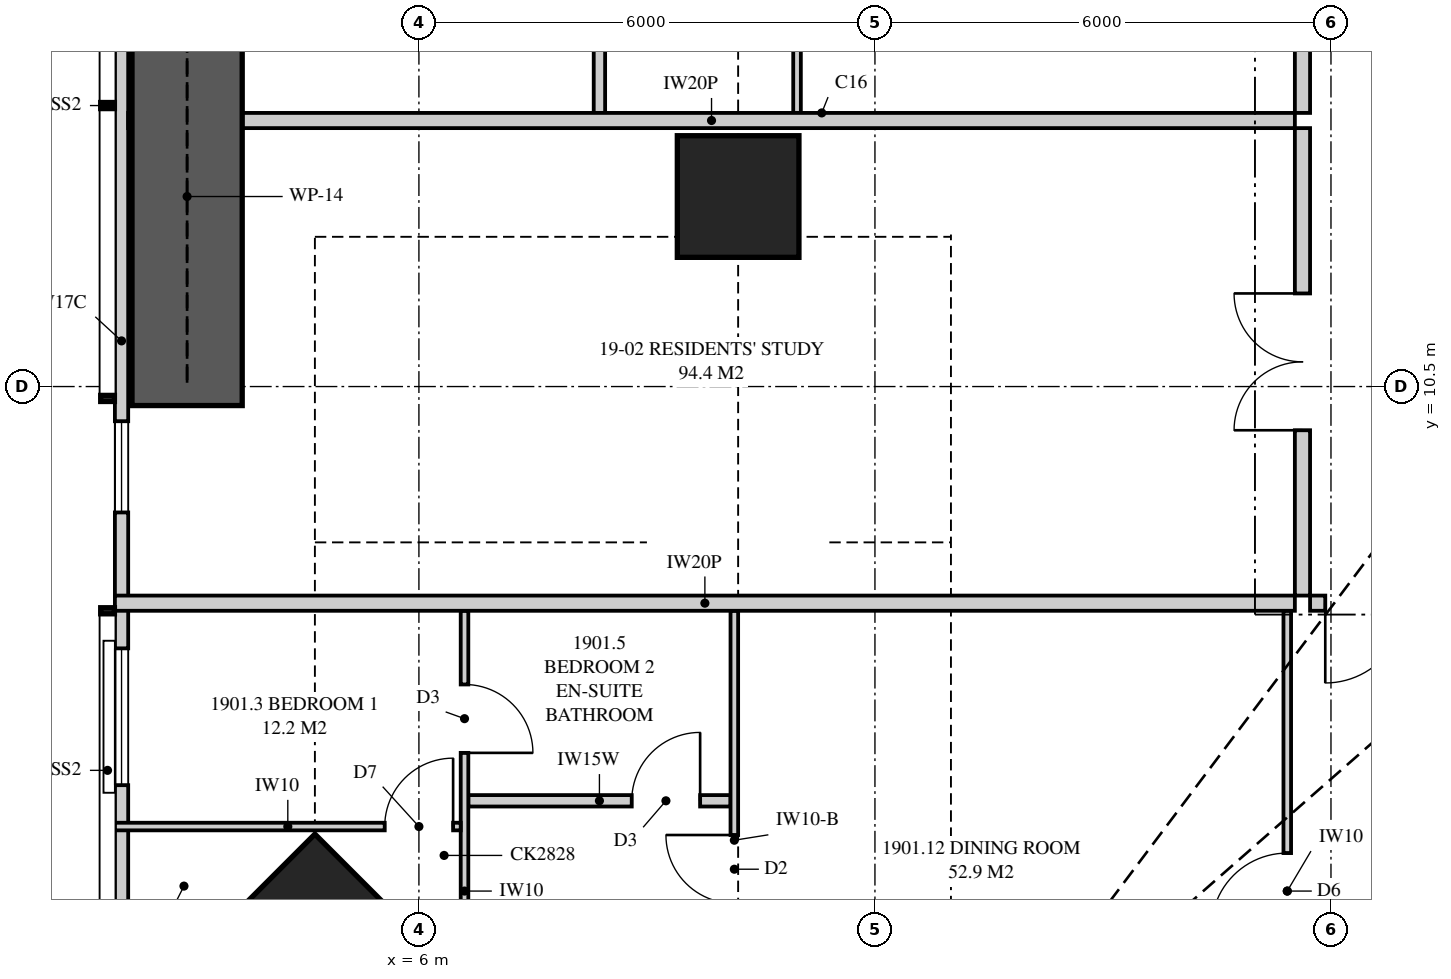
"""IFC4 building model, lengths in metres.
Left out: names, types, materials, properties, quantities, classifications, styles, units other than length and angle.
Written with IfcOpenShell. Run it as: python <this file> out.ifc"""

import sys

from ifc_helpers import new_model, si_unit, direction, frame, frame_2d, origin, origin_2d, place, context, subcontext, project, spatial, polyline, rectangle, hollow_rectangle, outline, extrude, element, fill, save


model = new_model("IFC4")
c1 = context("Model", 3, precision=1e-05, world=origin(), true_north=direction((0.0, 1.0)))
c2 = subcontext(c1, "Body", "Model", "MODEL_VIEW")
j1 = project(units=[si_unit("LENGTHUNIT", "METRE"), si_unit("PLANEANGLEUNIT", "RADIAN")], contexts=[c1])
p1 = place(None, origin())
s1 = spatial("IfcSite", under=j1, at=p1, CompositionType="ELEMENT")
p2 = place(p1, origin())
s2 = spatial("IfcBuilding", under=s1, at=p2, CompositionType="ELEMENT")
p3 = place(p2, frame((0.0, 0.0, 71.25)))
s3 = spatial("IfcBuildingStorey", under=s2, at=p3, CompositionType="ELEMENT", Elevation=71.25)
p4 = place(p3, frame((4.631, 2.631, 0.0), z_axis=(0.0, 0.0, 1.0), x_axis=(0.707106781187, 0.707106781187, 0.0)))
e1 = element("IfcColumn", 1, at=p4, inside=s3, PredefinedType="COLUMN", context=c2, shape_type="SweptSolid", body=[
    extrude(hollow_rectangle(XDim=2.8, YDim=2.8, WallThickness=0.175, at=origin_2d()), origin(), (0.0, 0.0, 1.0), 3.5),
])
p5 = place(p3, frame((10.2, 13.0, 0.0), z_axis=(0.0, 0.0, 1.0), x_axis=(1.0, 0.0, 0.0)))
e2 = element("IfcColumn", 2, at=p5, inside=s3, PredefinedType="COLUMN", context=c2, shape_type="SweptSolid", body=[
    extrude(rectangle(XDim=1.6, YDim=1.6, at=origin_2d()), origin(), (0.0, 0.0, 1.0), 3.5),
])
p6 = place(p3, frame((2.087, 19.15, 0.0), z_axis=(0.0, 0.0, 1.0), x_axis=(0.0, -1.0, 0.0)))
e3 = element("IfcWall", 3, at=p6, inside=s3, PredefinedType="SOLIDWALL", context=c2, shape_type="SweptSolid", body=[
    extrude(rectangle(XDim=16.099, YDim=0.175, at=frame_2d((8.049, 0.0))), origin(), (0.0, 0.0, 1.0), 3.22),
])
p7 = place(p6, frame((1.488, 0.0, 0.4)))
e4 = element("IfcOpeningElement", 4, at=p7, cuts=e3, PredefinedType="OPENING", context=c2, shape_type="SweptSolid", body=[
    extrude(rectangle(XDim=1.8, YDim=1.85, at=frame_2d((0.9, 0.925))), frame((0.0, 0.097, 0.0), z_axis=(0.0, -1.0, 0.0), x_axis=(1.0, 0.0, 0.0)), (0.0, 0.0, 1.0), 0.195),
])
p8 = place(p6, frame((9.106, 0.0, 0.4)))
e5 = element("IfcOpeningElement", 5, at=p8, cuts=e3, PredefinedType="OPENING", context=c2, shape_type="SweptSolid", body=[
    extrude(rectangle(XDim=1.2, YDim=1.85, at=frame_2d((0.6, 0.925))), frame((0.0, 0.097, 0.0), z_axis=(0.0, -1.0, 0.0), x_axis=(1.0, 0.0, 0.0)), (0.0, 0.0, 1.0), 0.195),
])
p9 = place(p6, frame((12.094, 0.0, 0.4)))
e6 = element("IfcOpeningElement", 6, at=p9, cuts=e3, PredefinedType="OPENING", context=c2, shape_type="SweptSolid", body=[
    extrude(rectangle(XDim=1.8, YDim=1.85, at=frame_2d((0.9, 0.925))), frame((0.0, 0.097, 0.0), z_axis=(0.0, -1.0, 0.0), x_axis=(1.0, 0.0, 0.0)), (0.0, 0.0, 1.0), 0.195),
])
p10 = place(p3, frame((17.725, 7.65, 0.0), z_axis=(0.0, 0.0, 1.0), x_axis=(1.0, 0.0, 0.0)))
e7 = element("IfcWall", 7, at=p10, inside=s3, PredefinedType="PARTITIONING", context=c2, shape_type="SweptSolid", body=[
    extrude(outline(polyline([(0.0, 0.0), (16.075, 0.0), (16.075, 3.22), (12.137, 3.22), (12.137, 2.641), (11.364, 2.641), (11.364, 3.22), (11.217, 3.22), (11.217, 2.641), (10.366, 2.641), (10.366, 3.22), (6.564, 3.22), (6.564, 2.694), (5.986, 2.694), (5.986, 3.22), (3.693, 3.22), (3.693, 2.641), (2.439, 2.641), (2.439, 3.22), (0.689, 3.22), (0.689, 2.641), (0.0, 2.641), (0.0, 0.0)])), frame((0.0, 0.1, 0.0), z_axis=(0.0, -1.0, 0.0), x_axis=(1.0, 0.0, 0.0)), (0.0, 0.0, 1.0), 0.2),
])
p11 = place(p10, frame((0.2, 0.0, 0.0)))
e8 = element("IfcOpeningElement", 8, at=p11, cuts=e7, PredefinedType="OPENING", context=c2, shape_type="SweptSolid", body=[
    extrude(rectangle(XDim=1.05, YDim=2.2, at=frame_2d((0.525, 1.1))), frame((0.0, 0.11, 0.0), z_axis=(0.0, -1.0, 0.0), x_axis=(1.0, 0.0, 0.0)), (0.0, 0.0, 1.0), 0.22),
])
p12 = place(p3, frame((6.6, 0.175, 0.0), z_axis=(0.0, 0.0, 1.0), x_axis=(0.0, 1.0, 0.0)))
e9 = element("IfcWall", 9, at=p12, inside=s3, PredefinedType="PARTITIONING", context=c2, shape_type="SweptSolid", body=[
    extrude(outline(polyline([(0.0, 0.0), (7.375, 0.0), (7.375, 3.22), (2.863, 3.22), (2.863, 2.848), (2.785, 2.854), (2.785, 2.1), (1.337, 2.1), (1.337, 3.22), (0.0, 3.22), (0.0, 0.0)])), frame((0.0, 0.05, 0.0), z_axis=(0.0, -1.0, 0.0), x_axis=(1.0, 0.0, 0.0)), (0.0, 0.0, 1.0), 0.1),
])
p13 = place(p12, frame((0.486, 0.0, 0.0)))
e10 = element("IfcOpeningElement", 10, at=p13, cuts=e9, PredefinedType="OPENING", context=c2, shape_type="SweptSolid", body=[
    extrude(rectangle(XDim=0.9, YDim=2.1, at=frame_2d((0.45, 1.05))), frame((0.0, 0.06, 0.0), z_axis=(0.0, -1.0, 0.0), x_axis=(1.0, 0.0, 0.0)), (0.0, 0.0, 1.0), 0.12),
])
p14 = place(p12, frame((5.506, 0.0, 0.0)))
e11 = element("IfcOpeningElement", 11, at=p14, cuts=e9, PredefinedType="OPENING", context=c2, shape_type="SweptSolid", body=[
    extrude(rectangle(XDim=0.9, YDim=2.1, at=frame_2d((0.45, 1.05))), frame((0.0, 0.06, 0.0), z_axis=(0.0, -1.0, 0.0), x_axis=(1.0, 0.0, 0.0)), (0.0, 0.0, 1.0), 0.12),
])
p15 = place(p3, frame((10.15, 1.513, 0.0), z_axis=(0.0, 0.0, 1.0), x_axis=(0.0, 1.0, 0.0)))
e12 = element("IfcWall", 12, at=p15, inside=s3, PredefinedType="PARTITIONING", context=c2, shape_type="SweptSolid", body=[
    extrude(outline(polyline([(0.0, 0.0), (6.037, 0.0), (6.037, 2.62), (0.734, 2.62), (0.734, 2.1), (0.0, 2.1), (0.0, 0.0)])), frame((0.0, 0.05, 0.0), z_axis=(0.0, -1.0, 0.0), x_axis=(1.0, 0.0, 0.0)), (0.0, 0.0, 1.0), 0.1),
])
p16 = place(p15, frame((2.188, 0.0, 0.0)))
e13 = element("IfcOpeningElement", 13, at=p16, cuts=e12, PredefinedType="OPENING", context=c2, shape_type="SweptSolid", body=[
    extrude(rectangle(XDim=0.9, YDim=2.1, at=frame_2d((0.45, 1.05))), frame((0.0, 0.06, 0.0), z_axis=(0.0, -1.0, 0.0), x_axis=(1.0, 0.0, 0.0)), (0.0, 0.0, 1.0), 0.12),
])
p17 = place(p3, frame((2.0, 4.711, 0.0), z_axis=(0.0, 0.0, 1.0), x_axis=(1.0, 0.0, 0.0)))
e14 = element("IfcWall", 14, at=p17, inside=s3, PredefinedType="PARTITIONING", context=c2, shape_type="SweptSolid", body=[
    extrude(outline(polyline([(0.0, 0.0), (4.55, 0.0), (4.55, 3.22), (3.407, 3.22), (3.407, 3.01), (3.404, 2.955), (3.011, 2.949), (3.011, 2.1), (1.577, 2.1), (1.577, 3.22), (0.0, 3.22), (0.0, 0.0)])), frame((0.0, 0.05, 0.0), z_axis=(0.0, -1.0, 0.0), x_axis=(1.0, 0.0, 0.0)), (0.0, 0.0, 1.0), 0.1),
])
p18 = place(p17, frame((3.55, 0.0, 0.0)))
e15 = element("IfcOpeningElement", 15, at=p18, cuts=e14, PredefinedType="OPENING", context=c2, shape_type="SweptSolid", body=[
    extrude(rectangle(XDim=0.9, YDim=2.1, at=frame_2d((0.45, 1.05))), frame((0.0, 0.06, 0.0), z_axis=(0.0, -1.0, 0.0), x_axis=(1.0, 0.0, 0.0)), (0.0, 0.0, 1.0), 0.12),
])
p19 = place(p3, frame((6.65, 5.05, 0.0), z_axis=(0.0, 0.0, 1.0), x_axis=(1.0, 0.0, 0.0)))
e16 = element("IfcWall", 16, at=p19, inside=s3, PredefinedType="PLUMBINGWALL", context=c2, shape_type="SweptSolid", body=[
    extrude(outline(polyline([(0.0, 0.0), (3.45, 0.0), (3.45, 3.22), (3.45, 2.62), (2.265, 2.62), (2.265, 3.22), (0.0, 3.22), (0.0, 0.0)])), frame((0.0, 0.075, 0.0), z_axis=(0.0, -1.0, 0.0), x_axis=(1.0, 0.0, 0.0)), (0.0, 0.0, 1.0), 0.15),
])
p20 = place(p19, frame((2.15, 0.0, 0.0)))
e17 = element("IfcOpeningElement", 17, at=p20, cuts=e16, PredefinedType="OPENING", context=c2, shape_type="SweptSolid", body=[
    extrude(rectangle(XDim=0.9, YDim=2.1, at=frame_2d((0.45, 1.05))), frame((0.0, 0.085, 0.0), z_axis=(0.0, -1.0, 0.0), x_axis=(1.0, 0.0, 0.0)), (0.0, 0.0, 1.0), 0.17),
])
p21 = place(p3, frame((17.425, 0.175, 0.0), z_axis=(0.0, 0.0, 1.0), x_axis=(0.0, 1.0, 0.0)))
e18 = element("IfcWall", 18, at=p21, inside=s3, PredefinedType="PARTITIONING", context=c2, shape_type="SweptSolid", body=[
    extrude(outline(polyline([(0.0, 0.0), (7.375, 0.0), (7.375, 3.22), (7.113, 3.22), (7.113, 2.641), (6.195, 2.641), (6.195, 3.22), (5.015, 3.22), (5.015, 2.641), (4.299, 2.641), (4.299, 3.22), (1.475, 3.22), (1.475, 2.1), (0.075, 2.1), (0.075, 3.22), (0.0, 3.22), (0.0, 0.0)])), frame((0.0, 0.05, 0.0), z_axis=(0.0, -1.0, 0.0), x_axis=(1.0, 0.0, 0.0)), (0.0, 0.0, 1.0), 0.1),
])
p22 = place(p21, frame((3.188, 0.0, 0.0)))
e19 = element("IfcOpeningElement", 19, at=p22, cuts=e18, PredefinedType="OPENING", context=c2, shape_type="SweptSolid", body=[
    extrude(rectangle(XDim=1.0, YDim=2.1, at=frame_2d((0.5, 1.05))), frame((0.0, 0.06, 0.0), z_axis=(0.0, -1.0, 0.0), x_axis=(1.0, 0.0, 0.0)), (0.0, 0.0, 1.0), 0.12),
])
p23 = place(p3, frame((2.0, 7.65, 0.0), z_axis=(0.0, 0.0, 1.0), x_axis=(1.0, 0.0, 0.0)))
e20 = element("IfcWall", 20, at=p23, inside=s3, PredefinedType="PARTITIONING", context=c2, shape_type="SweptSolid", body=[
    extrude(outline(polyline([(0.0, 0.0), (15.525, 0.0), (15.525, 3.22), (11.349, 3.22), (11.349, 2.621), (10.651, 2.621), (10.651, 3.22), (9.51, 3.22), (9.51, 2.62), (6.89, 2.62), (6.89, 3.22), (2.98, 3.22), (2.98, 2.621), (2.543, 2.621), (2.543, 2.1), (1.092, 2.1), (1.092, 3.22), (0.0, 3.22), (0.0, 0.0)])), frame((0.0, 0.1, 0.0), z_axis=(0.0, -1.0, 0.0), x_axis=(1.0, 0.0, 0.0)), (0.0, 0.0, 1.0), 0.2),
])
p24 = place(p3, frame((2.175, 14.0, 0.0), z_axis=(0.0, 0.0, 1.0), x_axis=(1.0, 0.0, 0.0)))
e21 = element("IfcWall", 21, at=p24, inside=s3, PredefinedType="PARTITIONING", context=c2, shape_type="SweptSolid", body=[
    extrude(outline(polyline([(0.075, 3.22), (0.0, 3.22), (0.0, 0.0), (0.529, 0.0), (0.529, 0.873), (1.021, 0.873), (1.021, 0.0), (15.35, 0.0), (15.35, 3.22), (9.335, 3.22), (9.335, 2.62), (6.715, 2.62), (6.715, 3.22), (1.475, 3.22), (1.475, 2.1), (1.021, 2.1), (1.021, 1.427), (0.529, 1.427), (0.529, 2.1), (0.075, 2.1), (0.075, 3.22)])), frame((0.0, 0.1, 0.0), z_axis=(0.0, -1.0, 0.0), x_axis=(1.0, 0.0, 0.0)), (0.0, 0.0, 1.0), 0.2),
])
p25 = place(p3, frame((17.625, 7.75, 0.0), z_axis=(0.0, 0.0, 1.0), x_axis=(0.0, 1.0, 0.0)))
e22 = element("IfcWall", 22, at=p25, inside=s3, PredefinedType="PARTITIONING", context=c2, shape_type="SweptSolid", body=[
    extrude(outline(polyline([(0.0, 0.0), (6.15, 0.0), (6.15, 3.22), (5.75, 3.22), (5.75, 2.22), (4.75, 2.22), (4.75, 3.22), (0.0, 3.22), (0.0, 0.0)])), frame((0.0, 0.1, 0.0), z_axis=(0.0, -1.0, 0.0), x_axis=(1.0, 0.0, 0.0)), (0.0, 0.0, 1.0), 0.2),
])
p26 = place(p25, frame((2.175, 0.0, 0.0)))
e23 = element("IfcOpeningElement", 23, at=p26, cuts=e22, PredefinedType="OPENING", context=c2, shape_type="SweptSolid", body=[
    extrude(rectangle(XDim=1.8, YDim=2.1, at=frame_2d((0.9, 1.05))), frame((0.0, 0.11, 0.0), z_axis=(0.0, -1.0, 0.0), x_axis=(1.0, 0.0, 0.0)), (0.0, 0.0, 1.0), 0.22),
])
p27 = place(p3, frame((17.625, 14.1, 0.0), z_axis=(0.0, 0.0, 1.0), x_axis=(0.0, 1.0, 0.0)))
e24 = element("IfcWall", 24, at=p27, inside=s3, PredefinedType="PARTITIONING", context=c2, shape_type="SweptSolid", body=[
    extrude(outline(polyline([(0.0, 0.0), (15.15, 0.0), (15.15, 3.22), (11.4, 3.22), (11.4, 2.22), (10.4, 2.22), (10.4, 3.22), (0.0, 3.22), (0.0, 0.0)])), frame((0.0, 0.1, 0.0), z_axis=(0.0, -1.0, 0.0), x_axis=(1.0, 0.0, 0.0)), (0.0, 0.0, 1.0), 0.2),
])
p28 = place(p27, frame((7.075, 0.0, 0.0)))
e25 = element("IfcOpeningElement", 25, at=p28, cuts=e24, PredefinedType="OPENING", context=c2, shape_type="SweptSolid", body=[
    extrude(rectangle(XDim=1.05, YDim=2.2, at=frame_2d((0.525, 1.1))), frame((0.0, 0.11, 0.0), z_axis=(0.0, -1.0, 0.0), x_axis=(1.0, 0.0, 0.0)), (0.0, 0.0, 1.0), 0.22),
])
p29 = place(p3, frame((8.375, 14.1, 0.0), z_axis=(0.0, 0.0, 1.0), x_axis=(0.0, 1.0, 0.0)))
e26 = element("IfcWall", 26, at=p29, inside=s3, PredefinedType="PLUMBINGWALL", context=c2, shape_type="SweptSolid", body=[
    extrude(rectangle(XDim=3.95, YDim=0.15, at=frame_2d((1.975, 0.0))), origin(), (0.0, 0.0, 1.0), 3.22),
])
p30 = place(p29, frame((2.65, 0.0, 0.0)))
e27 = element("IfcOpeningElement", 27, at=p30, cuts=e26, PredefinedType="OPENING", context=c2, shape_type="SweptSolid", body=[
    extrude(rectangle(XDim=0.9, YDim=2.1, at=frame_2d((0.45, 1.05))), frame((0.0, 0.085, 0.0), z_axis=(0.0, -1.0, 0.0), x_axis=(1.0, 0.0, 0.0)), (0.0, 0.0, 1.0), 0.17),
])
p31 = place(p3, frame((10.975, 14.1, 0.0), z_axis=(0.0, 0.0, 1.0), x_axis=(0.0, 1.0, 0.0)))
e28 = element("IfcWall", 28, at=p31, inside=s3, PredefinedType="PARTITIONING", context=c2, shape_type="SweptSolid", body=[
    extrude(outline(polyline([(0.0, 0.0), (3.95, 0.0), (3.95, 3.22), (3.95, 2.62), (0.0, 2.62), (0.0, 3.22), (0.0, 0.0)])), frame((0.0, 0.05, 0.0), z_axis=(0.0, -1.0, 0.0), x_axis=(1.0, 0.0, 0.0)), (0.0, 0.0, 1.0), 0.1),
])
p32 = place(p3, frame((2.95, 10.25, 0.0), z_axis=(0.0, 0.0, 1.0), x_axis=(0.0, 1.0, 0.0)))
e29 = element("IfcWall", 29, at=p32, inside=s3, PredefinedType="SHEAR", context=c2, shape_type="SweptSolid", body=[
    extrude(rectangle(XDim=5.5, YDim=1.45, at=frame_2d((2.75, 0.0))), origin(), (0.0, 0.0, 1.0), 3.5),
])
p33 = place(p8, origin())
e30 = element("IfcWindow", 30, at=p33, inside=s3, PartitioningType="SINGLE_PANEL", PredefinedType="WINDOW", context=c2, shape_type="SweptSolid", body=[
    extrude(rectangle(XDim=1.2, YDim=1.85, at=frame_2d((0.6, 0.925))), frame((0.0, 0.03, 0.0), z_axis=(0.0, -1.0, 0.0), x_axis=(1.0, 0.0, 0.0)), (0.0, 0.0, 1.0), 0.06),
])
fill(e5, e30)
p34 = place(p9, origin())
e31 = element("IfcWindow", 31, at=p34, inside=s3, PartitioningType="SINGLE_PANEL", PredefinedType="WINDOW", context=c2, shape_type="SweptSolid", body=[
    extrude(rectangle(XDim=1.8, YDim=1.85, at=frame_2d((0.9, 0.925))), frame((0.0, 0.03, 0.0), z_axis=(0.0, -1.0, 0.0), x_axis=(1.0, 0.0, 0.0)), (0.0, 0.0, 1.0), 0.06),
])
fill(e6, e31)
p35 = place(p11, frame((1.05, 0.0, 0.0), z_axis=(0.0, 0.0, 1.0), x_axis=(-1.0, 0.0, 0.0)))
e32 = element("IfcDoor", 32, at=p35, inside=s3, OperationType="SINGLE_SWING_RIGHT", PredefinedType="DOOR", context=c2, shape_type="SweptSolid", body=[
    extrude(rectangle(XDim=1.05, YDim=2.2, at=frame_2d((0.525, 1.1))), frame((0.0, 0.025, 0.0), z_axis=(0.0, -1.0, 0.0), x_axis=(1.0, 0.0, 0.0)), (0.0, 0.0, 1.0), 0.05),
])
fill(e8, e32)
p36 = place(p18, origin())
e33 = element("IfcDoor", 33, at=p36, inside=s3, OperationType="SINGLE_SWING_RIGHT", PredefinedType="DOOR", context=c2, shape_type="SweptSolid", body=[
    extrude(rectangle(XDim=0.9, YDim=2.1, at=frame_2d((0.45, 1.05))), frame((0.0, 0.025, 0.0), z_axis=(0.0, -1.0, 0.0), x_axis=(1.0, 0.0, 0.0)), (0.0, 0.0, 1.0), 0.05),
])
fill(e15, e33)
p37 = place(p16, origin())
e34 = element("IfcDoor", 34, at=p37, inside=s3, OperationType="SINGLE_SWING_RIGHT", PredefinedType="DOOR", context=c2, shape_type="SweptSolid", body=[
    extrude(rectangle(XDim=0.9, YDim=2.1, at=frame_2d((0.45, 1.05))), frame((0.0, 0.025, 0.0), z_axis=(0.0, -1.0, 0.0), x_axis=(1.0, 0.0, 0.0)), (0.0, 0.0, 1.0), 0.05),
])
fill(e13, e34)
p38 = place(p20, origin())
e35 = element("IfcDoor", 35, at=p38, inside=s3, OperationType="SINGLE_SWING_RIGHT", PredefinedType="DOOR", context=c2, shape_type="SweptSolid", body=[
    extrude(rectangle(XDim=0.9, YDim=2.1, at=frame_2d((0.45, 1.05))), frame((0.0, 0.025, 0.0), z_axis=(0.0, -1.0, 0.0), x_axis=(1.0, 0.0, 0.0)), (0.0, 0.0, 1.0), 0.05),
])
fill(e17, e35)
p39 = place(p14, frame((0.9, 0.0, 0.0), z_axis=(0.0, 0.0, 1.0), x_axis=(-1.0, 0.0, 0.0)))
e36 = element("IfcDoor", 36, at=p39, inside=s3, OperationType="SINGLE_SWING_RIGHT", PredefinedType="DOOR", context=c2, shape_type="SweptSolid", body=[
    extrude(rectangle(XDim=0.9, YDim=2.1, at=frame_2d((0.45, 1.05))), frame((0.0, 0.025, 0.0), z_axis=(0.0, -1.0, 0.0), x_axis=(1.0, 0.0, 0.0)), (0.0, 0.0, 1.0), 0.05),
])
fill(e11, e36)
p40 = place(p22, origin())
e37 = element("IfcDoor", 37, at=p40, inside=s3, OperationType="SINGLE_SWING_LEFT", PredefinedType="DOOR", context=c2, shape_type="SweptSolid", body=[
    extrude(rectangle(XDim=1.0, YDim=2.1, at=frame_2d((0.5, 1.05))), frame((0.0, 0.025, 0.0), z_axis=(0.0, -1.0, 0.0), x_axis=(1.0, 0.0, 0.0)), (0.0, 0.0, 1.0), 0.05),
])
fill(e19, e37)
p41 = place(p26, origin())
e38 = element("IfcDoor", 38, at=p41, inside=s3, OperationType="DOUBLE_DOOR_SINGLE_SWING", PredefinedType="DOOR", context=c2, shape_type="SweptSolid", body=[
    extrude(rectangle(XDim=1.8, YDim=2.1, at=frame_2d((0.9, 1.05))), frame((0.0, 0.025, 0.0), z_axis=(0.0, -1.0, 0.0), x_axis=(1.0, 0.0, 0.0)), (0.0, 0.0, 1.0), 0.05),
])
fill(e23, e38)
save(model, sys.argv[1])
